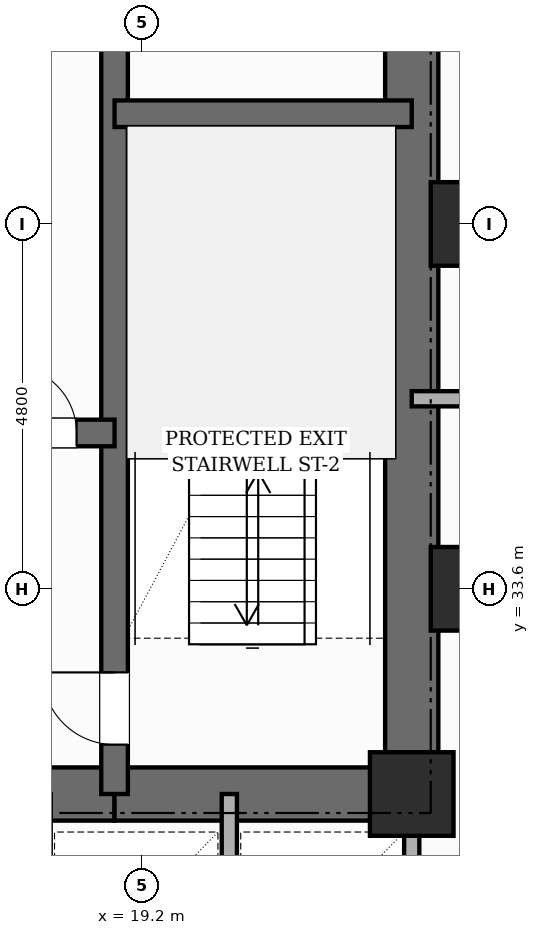
"""IFC4 building model, lengths in metres.
Left out: names, types, materials, properties, quantities, classifications, styles, units other than length and angle.
Written with IfcOpenShell. Run it as: python <this file> out.ifc"""

import sys

from ifc_helpers import new_model, si_unit, direction, frame, frame_2d, origin, origin_2d, place, context, subcontext, project, spatial, rectangle, extrude, element, fill, save


model = new_model("IFC4")
c1 = context("Model", 3, precision=1e-05, world=origin(), true_north=direction((0.0, 1.0)))
c2 = subcontext(c1, "Body", "Model", "MODEL_VIEW")
j1 = project(units=[si_unit("LENGTHUNIT", "METRE"), si_unit("PLANEANGLEUNIT", "RADIAN")], contexts=[c1])
p1 = place(None, origin())
s1 = spatial("IfcSite", under=j1, at=p1, CompositionType="ELEMENT")
p2 = place(p1, origin())
s2 = spatial("IfcBuilding", under=s1, at=p2, CompositionType="ELEMENT")
p3 = place(p2, frame((0.0, 0.0, 46.6)))
s3 = spatial("IfcBuildingStorey", under=s2, at=p3, CompositionType="ELEMENT", Elevation=46.6)
p4 = place(p3, frame((22.75, 30.55, 0.0), z_axis=(0.0, 0.0, 1.0), x_axis=(0.0, 1.0, 0.0)))
e1 = element("IfcWall", 1, at=p4, inside=s3, PredefinedType="SHEAR", context=c2, shape_type="SweptSolid", body=[
    extrude(rectangle(XDim=15.6, YDim=0.7, at=frame_2d((7.8, 0.0))), origin(), (0.0, 0.0, 1.0), 3.6),
])
p5 = place(p4, frame((10.8, 0.0, 0.0)))
e2 = element("IfcOpeningElement", 2, at=p5, cuts=e1, PredefinedType="OPENING", context=c2, shape_type="SweptSolid", body=[
    extrude(rectangle(XDim=1.0, YDim=2.15, at=frame_2d((0.5, 1.075))), frame((0.0, 0.36, 0.0), z_axis=(0.0, -1.0, 0.0), x_axis=(1.0, 0.0, 0.0)), (0.0, 0.0, 1.0), 0.72),
])
p6 = place(p3, frame((9.96, 30.9, 0.0), z_axis=(0.0, 0.0, 1.0), x_axis=(1.0, 0.0, 0.0)))
e3 = element("IfcWall", 3, at=p6, inside=s3, PredefinedType="SHEAR", context=c2, shape_type="SweptSolid", body=[
    extrude(rectangle(XDim=8.88, YDim=0.7, at=frame_2d((4.44, 0.0))), origin(), (0.0, 0.0, 1.0), 3.6),
])
p7 = place(p6, frame((4.09, 0.0, 0.0)))
e4 = element("IfcOpeningElement", 4, at=p7, cuts=e3, PredefinedType="OPENING", context=c2, shape_type="SweptSolid", body=[
    extrude(rectangle(XDim=1.0, YDim=2.15, at=frame_2d((0.5, 1.075))), frame((0.0, 0.36, 0.0), z_axis=(0.0, -1.0, 0.0), x_axis=(1.0, 0.0, 0.0)), (0.0, 0.0, 1.0), 0.72),
])
p8 = place(p3, frame((18.84, 30.9, 0.0), z_axis=(0.0, 0.0, 1.0), x_axis=(1.0, 0.0, 0.0)))
e5 = element("IfcWall", 5, at=p8, inside=s3, PredefinedType="SHEAR", context=c2, shape_type="SweptSolid", body=[
    extrude(rectangle(XDim=3.91, YDim=0.7, at=frame_2d((1.955, 0.0))), origin(), (0.0, 0.0, 1.0), 3.6),
])
p9 = place(p3, frame((18.84, 30.9, 0.0), z_axis=(0.0, 0.0, 1.0), x_axis=(0.0, 1.0, 0.0)))
e6 = element("IfcWall", 6, at=p9, inside=s3, PredefinedType="SHEAR", context=c2, shape_type="SweptSolid", body=[
    extrude(rectangle(XDim=14.9, YDim=0.35, at=frame_2d((7.45, 0.0))), origin(), (0.0, 0.0, 1.0), 3.6),
])
p10 = place(p9, frame((0.65, 0.0, 0.0)))
e7 = element("IfcOpeningElement", 7, at=p10, cuts=e6, PredefinedType="OPENING", context=c2, shape_type="SweptSolid", body=[
    extrude(rectangle(XDim=0.95, YDim=2.1, at=frame_2d((0.475, 1.05))), frame((0.0, 0.185, 0.0), z_axis=(0.0, -1.0, 0.0), x_axis=(1.0, 0.0, 0.0)), (0.0, 0.0, 1.0), 0.37),
])
p11 = place(p9, frame((10.45, 0.0, 0.0)))
e8 = element("IfcOpeningElement", 8, at=p11, cuts=e6, PredefinedType="OPENING", context=c2, shape_type="SweptSolid", body=[
    extrude(rectangle(XDim=1.0, YDim=2.15, at=frame_2d((0.5, 1.075))), frame((0.0, 0.185, 0.0), z_axis=(0.0, -1.0, 0.0), x_axis=(1.0, 0.0, 0.0)), (0.0, 0.0, 1.0), 0.37),
])
p12 = place(p3, frame((18.84, 39.85, 0.0), z_axis=(0.0, 0.0, 1.0), x_axis=(1.0, 0.0, 0.0)))
e9 = element("IfcWall", 9, at=p12, inside=s3, PredefinedType="SHEAR", context=c2, shape_type="SweptSolid", body=[
    extrude(rectangle(XDim=3.91, YDim=0.35, at=frame_2d((1.955, 0.0))), origin(), (0.0, 0.0, 1.0), 3.6),
])
p13 = place(p3, frame((9.96, 35.65, 0.0), z_axis=(0.0, 0.0, 1.0), x_axis=(1.0, 0.0, 0.0)))
e10 = element("IfcWall", 10, at=p13, inside=s3, PredefinedType="SHEAR", context=c2, shape_type="SweptSolid", body=[
    extrude(rectangle(XDim=8.88, YDim=0.35, at=frame_2d((4.44, 0.0))), origin(), (0.0, 0.0, 1.0), 3.6),
])
p14 = place(p13, frame((0.84, 0.0, 0.0)))
e11 = element("IfcOpeningElement", 11, at=p14, cuts=e10, PredefinedType="OPENING", context=c2, shape_type="SweptSolid", body=[
    extrude(rectangle(XDim=1.1, YDim=2.15, at=frame_2d((0.55, 1.075))), frame((0.0, 0.185, 0.0), z_axis=(0.0, -1.0, 0.0), x_axis=(1.0, 0.0, 0.0)), (0.0, 0.0, 1.0), 0.37),
])
p15 = place(p13, frame((5.24, 0.0, 0.0)))
e12 = element("IfcOpeningElement", 12, at=p15, cuts=e10, PredefinedType="OPENING", context=c2, shape_type="SweptSolid", body=[
    extrude(rectangle(XDim=1.1, YDim=2.15, at=frame_2d((0.55, 1.075))), frame((0.0, 0.185, 0.0), z_axis=(0.0, -1.0, 0.0), x_axis=(1.0, 0.0, 0.0)), (0.0, 0.0, 1.0), 0.37),
])
p16 = place(p13, frame((7.5, 0.0, 0.0)))
e13 = element("IfcOpeningElement", 13, at=p16, cuts=e10, PredefinedType="OPENING", context=c2, shape_type="SweptSolid", body=[
    extrude(rectangle(XDim=0.88, YDim=2.1, at=frame_2d((0.44, 1.05))), frame((0.0, 0.185, 0.0), z_axis=(0.0, -1.0, 0.0), x_axis=(1.0, 0.0, 0.0)), (0.0, 0.0, 1.0), 0.37),
])
for number, where, z_axis, x_axis in (
    (14, (22.75, 30.9, 0.0), (0.0, 0.0, 1.0), (1.0, 0.0, 0.0)),
    (15, (23.55, 33.6, 0.0), (0.0, 0.0, 1.0), (1.0, 0.0, 0.0)),
    (16, (23.55, 38.4, 0.0), (0.0, 0.0, 1.0), (1.0, 0.0, 0.0)),
):
    element("IfcColumn", number, at=place(p3, frame(where, z_axis=z_axis, x_axis=x_axis)), inside=s3, PredefinedType="COLUMN", context=c2, shape_type="SweptSolid", body=[
        extrude(rectangle(XDim=1.1, YDim=1.1, at=origin_2d()), origin(), (0.0, 0.0, 1.0), 3.6),
    ])
p17 = place(p3, frame((22.75, 27.9, 0.0), z_axis=(0.0, 0.0, 1.0), x_axis=(0.0, 1.0, 0.0)))
e17 = element("IfcWall", 17, at=p17, inside=s3, PredefinedType="POLYGONAL", context=c2, shape_type="SweptSolid", body=[
    extrude(rectangle(XDim=3.0, YDim=0.2, at=frame_2d((1.5, 0.0))), origin(), (0.0, 0.0, 1.0), 3.35),
])
p18 = place(p3, frame((20.35, 28.0, 0.0), z_axis=(0.0, 0.0, 1.0), x_axis=(0.0, 1.0, 0.0)))
e18 = element("IfcWall", 18, at=p18, inside=s3, PredefinedType="POLYGONAL", context=c2, shape_type="SweptSolid", body=[
    extrude(rectangle(XDim=2.9, YDim=0.2, at=frame_2d((1.45, 0.0))), origin(), (0.0, 0.0, 1.0), 3.35),
])
p19 = place(p3, frame((22.75, 36.1, 0.0), z_axis=(0.0, 0.0, 1.0), x_axis=(1.0, 0.0, 0.0)))
e19 = element("IfcWall", 19, at=p19, inside=s3, PredefinedType="PARTITIONING", context=c2, shape_type="SweptSolid", body=[
    extrude(rectangle(XDim=21.27, YDim=0.2, at=frame_2d((10.635, 0.0))), origin(), (0.0, 0.0, 1.0), 3.35),
])
p20 = place(p19, frame((1.271, 0.0, 0.0)))
e20 = element("IfcOpeningElement", 20, at=p20, cuts=e19, PredefinedType="OPENING", context=c2, shape_type="SweptSolid", body=[
    extrude(rectangle(XDim=0.98, YDim=2.18, at=frame_2d((0.49, 1.09))), frame((0.0, 0.11, 0.0), z_axis=(0.0, -1.0, 0.0), x_axis=(1.0, 0.0, 0.0)), (0.0, 0.0, 1.0), 0.22),
])
p21 = place(p19, frame((7.54, 0.0, 0.0)))
e21 = element("IfcOpeningElement", 21, at=p21, cuts=e19, PredefinedType="OPENING", context=c2, shape_type="SweptSolid", body=[
    extrude(rectangle(XDim=0.98, YDim=2.18, at=frame_2d((0.49, 1.09))), frame((0.0, 0.11, 0.0), z_axis=(0.0, -1.0, 0.0), x_axis=(1.0, 0.0, 0.0)), (0.0, 0.0, 1.0), 0.22),
])
p22 = place(p19, frame((15.615, 0.0, 0.0)))
e22 = element("IfcOpeningElement", 22, at=p22, cuts=e19, PredefinedType="OPENING", context=c2, shape_type="SweptSolid", body=[
    extrude(rectangle(XDim=0.98, YDim=2.18, at=frame_2d((0.49, 1.09))), frame((0.0, 0.11, 0.0), z_axis=(0.0, -1.0, 0.0), x_axis=(1.0, 0.0, 0.0)), (0.0, 0.0, 1.0), 0.22),
])
p23 = place(p10, origin())
e23 = element("IfcDoor", 23, at=p23, inside=s3, OperationType="SINGLE_SWING_RIGHT", PredefinedType="DOOR", context=c2, shape_type="SweptSolid", body=[
    extrude(rectangle(XDim=0.95, YDim=2.1, at=frame_2d((0.475, 1.05))), frame((0.0, 0.025, 0.0), z_axis=(0.0, -1.0, 0.0), x_axis=(1.0, 0.0, 0.0)), (0.0, 0.0, 1.0), 0.05),
])
fill(e7, e23)
p24 = place(p16, origin())
e24 = element("IfcDoor", 24, at=p24, inside=s3, OperationType="SINGLE_SWING_LEFT", PredefinedType="DOOR", context=c2, shape_type="SweptSolid", body=[
    extrude(rectangle(XDim=0.88, YDim=2.1, at=frame_2d((0.44, 1.05))), frame((0.0, 0.025, 0.0), z_axis=(0.0, -1.0, 0.0), x_axis=(1.0, 0.0, 0.0)), (0.0, 0.0, 1.0), 0.05),
])
fill(e13, e24)
save(model, sys.argv[1])
